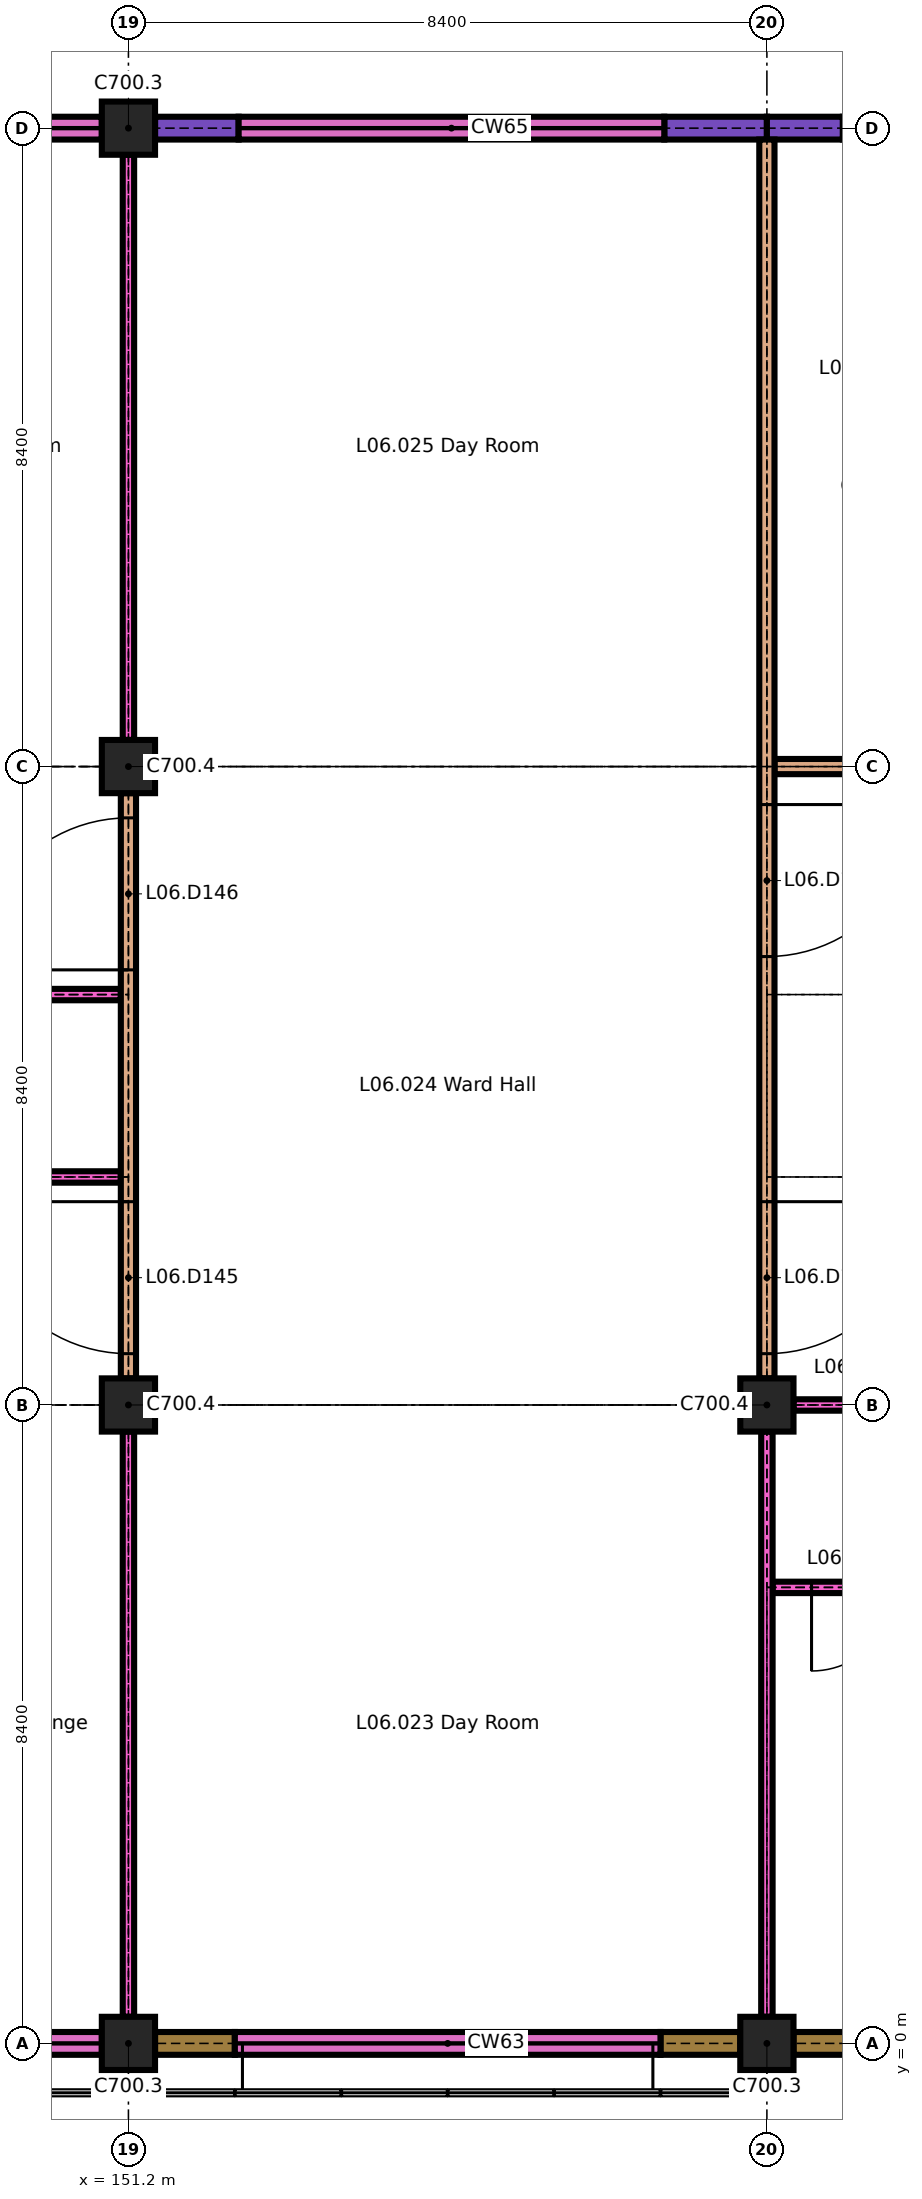
"""IFC4 building model, lengths in metres.
Left out: names, types, materials, properties, quantities, classifications, styles, units other than length and angle.
Written with IfcOpenShell. Run it as: python <this file> out.ifc"""

import sys

from ifc_helpers import new_model, si_unit, direction, frame, frame_2d, origin, origin_2d, place, context, subcontext, project, spatial, rectangle, extrude, element, fill, save


model = new_model("IFC4")
c1 = context("Model", 3, precision=1e-05, world=origin(), true_north=direction((0.0, 1.0)))
c2 = subcontext(c1, "Body", "Model", "MODEL_VIEW")
j1 = project(units=[si_unit("LENGTHUNIT", "METRE"), si_unit("PLANEANGLEUNIT", "RADIAN")], contexts=[c1])
p1 = place(None, origin())
s1 = spatial("IfcSite", under=j1, at=p1, CompositionType="ELEMENT")
p2 = place(p1, origin())
s2 = spatial("IfcBuilding", under=s1, at=p2, CompositionType="ELEMENT")
p3 = place(p2, frame((0.0, 0.0, 26.1)))
s3 = spatial("IfcBuildingStorey", under=s2, at=p3, CompositionType="ELEMENT", Elevation=26.1)
for number, where, z_axis, x_axis in (
    (1, (151.2, 0.0, 0.0), (0.0, 0.0, 1.0), (1.0, 0.0, 0.0)),
    (2, (159.6, 0.0, 0.0), (0.0, 0.0, 1.0), (1.0, 0.0, 0.0)),
):
    element("IfcColumn", number, at=place(p3, frame(where, z_axis=z_axis, x_axis=x_axis)), inside=s3, PredefinedType="COLUMN", context=c2, shape_type="SweptSolid", body=[
        extrude(rectangle(XDim=0.7, YDim=0.7, at=origin_2d()), origin(), (0.0, 0.0, 1.0), 3.2),
    ])
for number, where, z_axis, x_axis in (
    (3, (151.2, 8.4, 0.0), (0.0, 0.0, 1.0), (1.0, 0.0, 0.0)),
    (4, (159.6, 8.4, 0.0), (0.0, 0.0, 1.0), (1.0, 0.0, 0.0)),
    (5, (151.2, 16.8, 0.0), (0.0, 0.0, 1.0), (1.0, 0.0, 0.0)),
):
    element("IfcColumn", number, at=place(p3, frame(where, z_axis=z_axis, x_axis=x_axis)), inside=s3, PredefinedType="COLUMN", context=c2, shape_type="SweptSolid", body=[
        extrude(rectangle(XDim=0.7, YDim=0.7, at=origin_2d()), origin(), (0.0, 0.0, 1.0), 3.3),
    ])
p4 = place(p3, frame((151.2, 25.2, 0.0), z_axis=(0.0, 0.0, 1.0), x_axis=(1.0, 0.0, 0.0)))
e6 = element("IfcColumn", 6, at=p4, inside=s3, PredefinedType="COLUMN", context=c2, shape_type="SweptSolid", body=[
    extrude(rectangle(XDim=0.7, YDim=0.7, at=origin_2d()), origin(), (0.0, 0.0, 1.0), 3.2),
])
p5 = place(p3, frame((147.0, 0.0, 0.0), z_axis=(0.0, 0.0, 1.0), x_axis=(1.0, 0.0, 0.0)))
e7 = element("IfcWall", 7, at=p5, inside=s3, PredefinedType="SOLIDWALL", context=c2, shape_type="SweptSolid", body=[
    extrude(rectangle(XDim=3.85, YDim=0.3, at=frame_2d((1.925, 0.0))), origin(), (0.0, 0.0, 1.0), 0.6),
])
for number, where, z_axis, x_axis in (
    (8, (151.55, 0.0, 0.0), (0.0, 0.0, 1.0), (1.0, 0.0, 0.0)),
    (9, (158.2, 0.0, 0.0), (0.0, 0.0, 1.0), (1.0, 0.0, 0.0)),
):
    element("IfcWall", number, at=place(p3, frame(where, z_axis=z_axis, x_axis=x_axis)), inside=s3, PredefinedType="SOLIDWALL", context=c2, shape_type="SweptSolid", body=[
        extrude(rectangle(XDim=1.05, YDim=0.3, at=frame_2d((0.525, 0.0))), origin(), (0.0, 0.0, 1.0), 2.9),
    ])
p6 = place(p3, frame((152.6, 0.0, 0.0), z_axis=(0.0, 0.0, 1.0), x_axis=(1.0, 0.0, 0.0)))
e10 = element("IfcWall", 10, at=p6, inside=s3, PredefinedType="SOLIDWALL", context=c2, shape_type="SweptSolid", body=[
    extrude(rectangle(XDim=5.6, YDim=0.3, at=frame_2d((2.8, 0.0))), origin(), (0.0, 0.0, 1.0), 0.6),
])
p7 = place(p3, frame((159.95, 0.0, 0.0), z_axis=(0.0, 0.0, 1.0), x_axis=(1.0, 0.0, 0.0)))
e11 = element("IfcWall", 11, at=p7, inside=s3, PredefinedType="SOLIDWALL", context=c2, shape_type="SweptSolid", body=[
    extrude(rectangle(XDim=3.85, YDim=0.3, at=frame_2d((1.925, 0.0))), origin(), (0.0, 0.0, 1.0), 2.9),
])
p8 = place(p7, frame((0.7, 0.0, 0.9)))
e12 = element("IfcOpeningElement", 12, at=p8, cuts=e11, PredefinedType="OPENING", context=c2, shape_type="SweptSolid", body=[
    extrude(rectangle(XDim=2.1, YDim=1.5, at=frame_2d((1.05, 0.75))), frame((0.0, 0.16, 0.0), z_axis=(0.0, -1.0, 0.0), x_axis=(1.0, 0.0, 0.0)), (0.0, 0.0, 1.0), 0.32),
])
p9 = place(p3, frame((147.0, 25.2, 0.0), z_axis=(0.0, 0.0, 1.0), x_axis=(1.0, 0.0, 0.0)))
e13 = element("IfcWall", 13, at=p9, inside=s3, PredefinedType="SOLIDWALL", context=c2, shape_type="SweptSolid", body=[
    extrude(rectangle(XDim=3.85, YDim=0.3, at=frame_2d((1.925, 0.0))), origin(), (0.0, 0.0, 1.0), 0.6),
])
p10 = place(p3, frame((151.55, 25.2, 0.0), z_axis=(0.0, 0.0, 1.0), x_axis=(1.0, 0.0, 0.0)))
e14 = element("IfcWall", 14, at=p10, inside=s3, PredefinedType="SOLIDWALL", context=c2, shape_type="SweptSolid", body=[
    extrude(rectangle(XDim=1.1, YDim=0.3, at=frame_2d((0.55, 0.0))), origin(), (0.0, 0.0, 1.0), 3.3),
])
p11 = place(p3, frame((158.25, 25.2, 0.0), z_axis=(0.0, 0.0, 1.0), x_axis=(1.0, 0.0, 0.0)))
e15 = element("IfcWall", 15, at=p11, inside=s3, PredefinedType="SOLIDWALL", context=c2, shape_type="SweptSolid", body=[
    extrude(rectangle(XDim=1.35, YDim=0.3, at=frame_2d((0.675, 0.0))), origin(), (0.0, 0.0, 1.0), 3.3),
])
p12 = place(p3, frame((152.65, 25.2, 0.0), z_axis=(0.0, 0.0, 1.0), x_axis=(1.0, 0.0, 0.0)))
e16 = element("IfcWall", 16, at=p12, inside=s3, PredefinedType="SOLIDWALL", context=c2, shape_type="SweptSolid", body=[
    extrude(rectangle(XDim=5.6, YDim=0.3, at=frame_2d((2.8, 0.0))), origin(), (0.0, 0.0, 1.0), 0.6),
])
p13 = place(p3, frame((159.6, 25.2, 0.0), z_axis=(0.0, 0.0, 1.0), x_axis=(1.0, 0.0, 0.0)))
e17 = element("IfcWall", 17, at=p13, inside=s3, PredefinedType="SOLIDWALL", context=c2, shape_type="SweptSolid", body=[
    extrude(rectangle(XDim=1.0, YDim=0.3, at=frame_2d((0.5, 0.0))), origin(), (0.0, 0.0, 1.0), 3.3),
])
p14 = place(p3, frame((159.675, 6.0, 0.0), z_axis=(0.0, 0.0, 1.0), x_axis=(1.0, 0.0, 0.0)))
e18 = element("IfcWall", 18, at=p14, inside=s3, PredefinedType="PARTITIONING", context=c2, shape_type="SweptSolid", body=[
    extrude(rectangle(XDim=2.2, YDim=0.15, at=frame_2d((1.1, 0.0))), origin(), (0.0, 0.0, 1.0), 3.3),
])
p15 = place(p14, frame((0.512, 0.0, 0.0)))
e19 = element("IfcOpeningElement", 19, at=p15, cuts=e18, PredefinedType="OPENING", context=c2, shape_type="SweptSolid", body=[
    extrude(rectangle(XDim=1.1, YDim=2.1, at=frame_2d((0.55, 1.05))), frame((0.0, 0.085, 0.0), z_axis=(0.0, -1.0, 0.0), x_axis=(1.0, 0.0, 0.0)), (0.0, 0.0, 1.0), 0.17),
])
p16 = place(p3, frame((159.95, 8.4, 0.0), z_axis=(0.0, 0.0, 1.0), x_axis=(1.0, 0.0, 0.0)))
e20 = element("IfcWall", 20, at=p16, inside=s3, PredefinedType="PARTITIONING", context=c2, shape_type="SweptSolid", body=[
    extrude(rectangle(XDim=7.7, YDim=0.15, at=frame_2d((3.85, 0.0))), origin(), (0.0, 0.0, 1.0), 3.3),
])
p17 = place(p16, frame((2.1, 0.0, 0.0)))
e21 = element("IfcOpeningElement", 21, at=p17, cuts=e20, PredefinedType="OPENING", context=c2, shape_type="SweptSolid", body=[
    extrude(rectangle(XDim=1.5, YDim=2.4, at=frame_2d((0.75, 1.2))), frame((0.0, 0.085, 0.0), z_axis=(0.0, -1.0, 0.0), x_axis=(1.0, 0.0, 0.0)), (0.0, 0.0, 1.0), 0.17),
])
p18 = place(p16, frame((4.15, 0.0, 0.0)))
e22 = element("IfcOpeningElement", 22, at=p18, cuts=e20, PredefinedType="OPENING", context=c2, shape_type="SweptSolid", body=[
    extrude(rectangle(XDim=1.2, YDim=2.1, at=frame_2d((0.6, 1.05))), frame((0.0, 0.085, 0.0), z_axis=(0.0, -1.0, 0.0), x_axis=(1.0, 0.0, 0.0)), (0.0, 0.0, 1.0), 0.17),
])
p19 = place(p3, frame((142.725, 11.4, 0.0), z_axis=(0.0, 0.0, 1.0), x_axis=(1.0, 0.0, 0.0)))
e23 = element("IfcWall", 23, at=p19, inside=s3, PredefinedType="PARTITIONING", context=c2, shape_type="SweptSolid", body=[
    extrude(rectangle(XDim=8.375, YDim=0.15, at=frame_2d((4.188, 0.0))), origin(), (0.0, 0.0, 1.0), 3.3),
])
p20 = place(p3, frame((134.5, 13.8, 0.0), z_axis=(0.0, 0.0, 1.0), x_axis=(1.0, 0.0, 0.0)))
e24 = element("IfcWall", 24, at=p20, inside=s3, PredefinedType="PARTITIONING", context=c2, shape_type="SweptSolid", body=[
    extrude(rectangle(XDim=16.6, YDim=0.15, at=frame_2d((8.3, 0.0))), origin(), (0.0, 0.0, 1.0), 3.3),
])
p21 = place(p20, frame((9.8, 0.0, 0.0)))
e25 = element("IfcOpeningElement", 25, at=p21, cuts=e24, PredefinedType="OPENING", context=c2, shape_type="SweptSolid", body=[
    extrude(rectangle(XDim=1.2, YDim=2.1, at=frame_2d((0.6, 1.05))), frame((0.0, 0.085, 0.0), z_axis=(0.0, -1.0, 0.0), x_axis=(1.0, 0.0, 0.0)), (0.0, 0.0, 1.0), 0.17),
])
p22 = place(p20, frame((13.95, 0.0, 0.0)))
e26 = element("IfcOpeningElement", 26, at=p22, cuts=e24, PredefinedType="OPENING", context=c2, shape_type="SweptSolid", body=[
    extrude(rectangle(XDim=1.2, YDim=2.1, at=frame_2d((0.6, 1.05))), frame((0.0, 0.085, 0.0), z_axis=(0.0, -1.0, 0.0), x_axis=(1.0, 0.0, 0.0)), (0.0, 0.0, 1.0), 0.17),
])
p23 = place(p3, frame((159.7, 16.8, 0.0), z_axis=(0.0, 0.0, 1.0), x_axis=(1.0, 0.0, 0.0)))
e27 = element("IfcWall", 27, at=p23, inside=s3, PredefinedType="PARTITIONING", context=c2, shape_type="SweptSolid", body=[
    extrude(rectangle(XDim=4.7, YDim=0.2, at=frame_2d((2.35, 0.0))), origin(), (0.0, 0.0, 1.0), 3.3),
])
p24 = place(p23, frame((1.35, 0.0, 0.0)))
e28 = element("IfcOpeningElement", 28, at=p24, cuts=e27, PredefinedType="OPENING", context=c2, shape_type="SweptSolid", body=[
    extrude(rectangle(XDim=2.0, YDim=2.4, at=frame_2d((1.0, 1.2))), frame((0.0, 0.11, 0.0), z_axis=(0.0, -1.0, 0.0), x_axis=(1.0, 0.0, 0.0)), (0.0, 0.0, 1.0), 0.22),
])
p25 = place(p3, frame((151.2, 0.35, 0.0), z_axis=(0.0, 0.0, 1.0), x_axis=(0.0, 1.0, 0.0)))
e29 = element("IfcWall", 29, at=p25, inside=s3, PredefinedType="PARTITIONING", context=c2, shape_type="SweptSolid", body=[
    extrude(rectangle(XDim=7.7, YDim=0.15, at=frame_2d((3.85, 0.0))), origin(), (0.0, 0.0, 1.0), 3.3),
])
p26 = place(p3, frame((151.2, 8.75, 0.0), z_axis=(0.0, 0.0, 1.0), x_axis=(0.0, 1.0, 0.0)))
e30 = element("IfcWall", 30, at=p26, inside=s3, PredefinedType="PARTITIONING", context=c2, shape_type="SweptSolid", body=[
    extrude(rectangle(XDim=7.7, YDim=0.2, at=frame_2d((3.85, 0.0))), origin(), (0.0, 0.0, 1.0), 3.3),
])
p27 = place(p26, frame((0.325, 0.0, 0.0)))
e31 = element("IfcOpeningElement", 31, at=p27, cuts=e30, PredefinedType="OPENING", context=c2, shape_type="SweptSolid", body=[
    extrude(rectangle(XDim=2.0, YDim=2.4, at=frame_2d((1.0, 1.2))), frame((0.0, 0.11, 0.0), z_axis=(0.0, -1.0, 0.0), x_axis=(1.0, 0.0, 0.0)), (0.0, 0.0, 1.0), 0.22),
])
p28 = place(p26, frame((5.375, 0.0, 0.0)))
e32 = element("IfcOpeningElement", 32, at=p28, cuts=e30, PredefinedType="OPENING", context=c2, shape_type="SweptSolid", body=[
    extrude(rectangle(XDim=2.0, YDim=2.4, at=frame_2d((1.0, 1.2))), frame((0.0, 0.11, 0.0), z_axis=(0.0, -1.0, 0.0), x_axis=(1.0, 0.0, 0.0)), (0.0, 0.0, 1.0), 0.22),
])
p29 = place(p3, frame((151.2, 17.15, 0.0), z_axis=(0.0, 0.0, 1.0), x_axis=(0.0, 1.0, 0.0)))
e33 = element("IfcWall", 33, at=p29, inside=s3, PredefinedType="PARTITIONING", context=c2, shape_type="SweptSolid", body=[
    extrude(rectangle(XDim=7.7, YDim=0.15, at=frame_2d((3.85, 0.0))), origin(), (0.0, 0.0, 1.0), 3.3),
])
p30 = place(p3, frame((159.6, 0.35, 0.0), z_axis=(0.0, 0.0, 1.0), x_axis=(0.0, 1.0, 0.0)))
e34 = element("IfcWall", 34, at=p30, inside=s3, PredefinedType="PARTITIONING", context=c2, shape_type="SweptSolid", body=[
    extrude(rectangle(XDim=7.7, YDim=0.15, at=frame_2d((3.85, 0.0))), origin(), (0.0, 0.0, 1.0), 3.3),
])
p31 = place(p3, frame((159.6, 8.75, 0.0), z_axis=(0.0, 0.0, 1.0), x_axis=(0.0, 1.0, 0.0)))
e35 = element("IfcWall", 35, at=p31, inside=s3, PredefinedType="PARTITIONING", context=c2, shape_type="SweptSolid", body=[
    extrude(rectangle(XDim=16.3, YDim=0.2, at=frame_2d((8.15, 0.0))), origin(), (0.0, 0.0, 1.0), 3.3),
])
p32 = place(p31, frame((0.325, 0.0, 0.0)))
e36 = element("IfcOpeningElement", 36, at=p32, cuts=e35, PredefinedType="OPENING", context=c2, shape_type="SweptSolid", body=[
    extrude(rectangle(XDim=2.0, YDim=2.4, at=frame_2d((1.0, 1.2))), frame((0.0, 0.11, 0.0), z_axis=(0.0, -1.0, 0.0), x_axis=(1.0, 0.0, 0.0)), (0.0, 0.0, 1.0), 0.22),
])
p33 = place(p31, frame((5.55, 0.0, 0.0)))
e37 = element("IfcOpeningElement", 37, at=p33, cuts=e35, PredefinedType="OPENING", context=c2, shape_type="SweptSolid", body=[
    extrude(rectangle(XDim=2.0, YDim=2.4, at=frame_2d((1.0, 1.2))), frame((0.0, 0.11, 0.0), z_axis=(0.0, -1.0, 0.0), x_axis=(1.0, 0.0, 0.0)), (0.0, 0.0, 1.0), 0.22),
])
p34 = place(p15, origin())
e38 = element("IfcDoor", 38, at=p34, inside=s3, OperationType="SINGLE_SWING_LEFT", PredefinedType="DOOR", context=c2, shape_type="SweptSolid", body=[
    extrude(rectangle(XDim=1.1, YDim=2.1, at=frame_2d((0.55, 1.05))), frame((0.0, 0.025, 0.0), z_axis=(0.0, -1.0, 0.0), x_axis=(1.0, 0.0, 0.0)), (0.0, 0.0, 1.0), 0.05),
])
fill(e19, e38)
p35 = place(p27, origin())
e39 = element("IfcDoor", 39, at=p35, inside=s3, OperationType="SINGLE_SWING_LEFT", PredefinedType="DOOR", context=c2, shape_type="SweptSolid", body=[
    extrude(rectangle(XDim=2.0, YDim=2.4, at=frame_2d((1.0, 1.2))), frame((0.0, 0.03, 0.0), z_axis=(0.0, -1.0, 0.0), x_axis=(1.0, 0.0, 0.0)), (0.0, 0.0, 1.0), 0.06),
])
fill(e31, e39)
p36 = place(p28, origin())
e40 = element("IfcDoor", 40, at=p36, inside=s3, OperationType="SINGLE_SWING_RIGHT", PredefinedType="DOOR", context=c2, shape_type="SweptSolid", body=[
    extrude(rectangle(XDim=2.0, YDim=2.4, at=frame_2d((1.0, 1.2))), frame((0.0, 0.03, 0.0), z_axis=(0.0, -1.0, 0.0), x_axis=(1.0, 0.0, 0.0)), (0.0, 0.0, 1.0), 0.06),
])
fill(e32, e40)
p37 = place(p32, origin())
e41 = element("IfcDoor", 41, at=p37, inside=s3, OperationType="SINGLE_SWING_RIGHT", PredefinedType="DOOR", context=c2, shape_type="SweptSolid", body=[
    extrude(rectangle(XDim=2.0, YDim=2.4, at=frame_2d((1.0, 1.2))), frame((0.0, 0.03, 0.0), z_axis=(0.0, -1.0, 0.0), x_axis=(1.0, 0.0, 0.0)), (0.0, 0.0, 1.0), 0.06),
])
fill(e36, e41)
p38 = place(p33, origin())
e42 = element("IfcDoor", 42, at=p38, inside=s3, OperationType="SINGLE_SWING_RIGHT", PredefinedType="DOOR", context=c2, shape_type="SweptSolid", body=[
    extrude(rectangle(XDim=2.0, YDim=2.4, at=frame_2d((1.0, 1.2))), frame((0.0, 0.03, 0.0), z_axis=(0.0, -1.0, 0.0), x_axis=(1.0, 0.0, 0.0)), (0.0, 0.0, 1.0), 0.06),
])
fill(e37, e42)
save(model, sys.argv[1])
